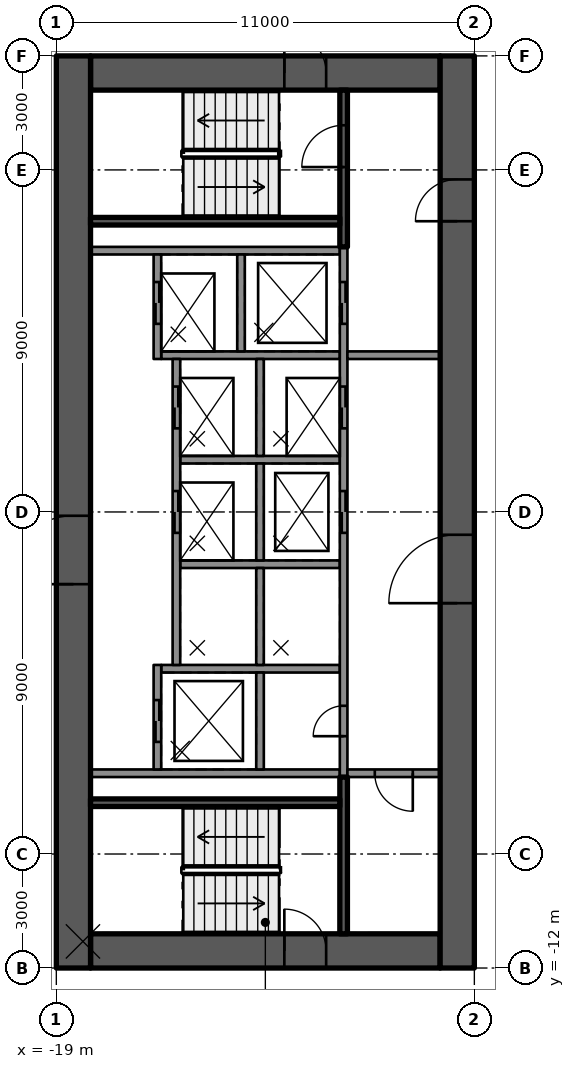
"""IFC4 building model, lengths in metres.
Left out: names, types, materials, properties, quantities, classifications, styles, units other than length and angle.
Written with IfcOpenShell. Run it as: python <this file> out.ifc"""

import sys

from ifc_helpers import new_model, si_unit, direction, frame, frame_2d, origin, place, context, subcontext, project, spatial, rectangle, extrude, element, fill, save


model = new_model("IFC4")
c1 = context("Model", 3, precision=1e-05, world=origin(), true_north=direction((0.0, 1.0)))
c2 = subcontext(c1, "Body", "Model", "MODEL_VIEW")
j1 = project(units=[si_unit("LENGTHUNIT", "METRE"), si_unit("PLANEANGLEUNIT", "RADIAN")], contexts=[c1])
p1 = place(None, origin())
s1 = spatial("IfcSite", under=j1, at=p1, CompositionType="ELEMENT")
p2 = place(p1, origin())
s2 = spatial("IfcBuilding", under=s1, at=p2, CompositionType="ELEMENT")
p3 = place(p2, frame((0.0, 0.0, 58.8)))
s3 = spatial("IfcBuildingStorey", under=s2, at=p3, CompositionType="ELEMENT", Elevation=58.8)
p4 = place(p3, frame((-18.1, 11.55, 0.0), z_axis=(0.0, 0.0, 1.0), x_axis=(1.0, 0.0, 0.0)))
e1 = element("IfcWall", 1, at=p4, inside=s3, PredefinedType="SHEAR", context=c2, shape_type="SweptSolid", body=[
    extrude(rectangle(XDim=9.2, YDim=0.9, at=frame_2d((4.6, 0.0))), origin(), (0.0, 0.0, 1.0), 3.5),
])
p5 = place(p4, frame((5.1, 0.0, 0.0)))
e2 = element("IfcOpeningElement", 2, at=p5, cuts=e1, PredefinedType="OPENING", context=c2, shape_type="SweptSolid", body=[
    extrude(rectangle(XDim=1.1, YDim=2.1, at=frame_2d((0.55, 1.05))), frame((0.0, 0.46, 0.0), z_axis=(0.0, -1.0, 0.0), x_axis=(1.0, 0.0, 0.0)), (0.0, 0.0, 1.0), 0.92),
])
p6 = place(p3, frame((-18.1, -11.55, 0.0), z_axis=(0.0, 0.0, 1.0), x_axis=(1.0, 0.0, 0.0)))
e3 = element("IfcWall", 3, at=p6, inside=s3, PredefinedType="SHEAR", context=c2, shape_type="SweptSolid", body=[
    extrude(rectangle(XDim=9.2, YDim=0.9, at=frame_2d((4.6, 0.0))), origin(), (0.0, 0.0, 1.0), 3.5),
])
p7 = place(p6, frame((5.1, 0.0, 0.0)))
e4 = element("IfcOpeningElement", 4, at=p7, cuts=e3, PredefinedType="OPENING", context=c2, shape_type="SweptSolid", body=[
    extrude(rectangle(XDim=1.1, YDim=2.1, at=frame_2d((0.55, 1.05))), frame((0.0, 0.46, 0.0), z_axis=(0.0, -1.0, 0.0), x_axis=(1.0, 0.0, 0.0)), (0.0, 0.0, 1.0), 0.92),
])
p8 = place(p3, frame((-18.55, -12.0, 0.0), z_axis=(0.0, 0.0, 1.0), x_axis=(0.0, 1.0, 0.0)))
e5 = element("IfcWall", 5, at=p8, inside=s3, PredefinedType="SHEAR", context=c2, shape_type="SweptSolid", body=[
    extrude(rectangle(XDim=24.0, YDim=0.9, at=frame_2d((12.0, 0.0))), origin(), (0.0, 0.0, 1.0), 3.5),
])
p9 = place(p8, frame((10.1, 0.0, 0.0)))
e6 = element("IfcOpeningElement", 6, at=p9, cuts=e5, PredefinedType="OPENING", context=c2, shape_type="SweptSolid", body=[
    extrude(rectangle(XDim=1.8, YDim=2.1, at=frame_2d((0.9, 1.05))), frame((0.0, 0.46, 0.0), z_axis=(0.0, -1.0, 0.0), x_axis=(1.0, 0.0, 0.0)), (0.0, 0.0, 1.0), 0.92),
])
p10 = place(p3, frame((-8.45, -12.0, 0.0), z_axis=(0.0, 0.0, 1.0), x_axis=(0.0, 1.0, 0.0)))
e7 = element("IfcWall", 7, at=p10, inside=s3, PredefinedType="SHEAR", context=c2, shape_type="SweptSolid", body=[
    extrude(rectangle(XDim=24.0, YDim=0.9, at=frame_2d((12.0, 0.0))), origin(), (0.0, 0.0, 1.0), 3.5),
])
p11 = place(p10, frame((9.6, 0.0, 0.0)))
e8 = element("IfcOpeningElement", 8, at=p11, cuts=e7, PredefinedType="OPENING", context=c2, shape_type="SweptSolid", body=[
    extrude(rectangle(XDim=1.8, YDim=2.1, at=frame_2d((0.9, 1.05))), frame((0.0, 0.46, 0.0), z_axis=(0.0, -1.0, 0.0), x_axis=(1.0, 0.0, 0.0)), (0.0, 0.0, 1.0), 0.92),
])
p12 = place(p10, frame((19.65, 0.0, 0.0)))
e9 = element("IfcOpeningElement", 9, at=p12, cuts=e7, PredefinedType="OPENING", context=c2, shape_type="SweptSolid", body=[
    extrude(rectangle(XDim=1.1, YDim=2.1, at=frame_2d((0.55, 1.05))), frame((0.0, 0.46, 0.0), z_axis=(0.0, -1.0, 0.0), x_axis=(1.0, 0.0, 0.0)), (0.0, 0.0, 1.0), 0.92),
])
for number, where, z_axis, x_axis in (
    (10, (-11.54, 6.875, 0.0), (0.0, 0.0, 1.0), (-1.0, 0.0, 0.0)),
    (11, (-11.54, -6.875, 0.0), (0.0, 0.0, 1.0), (-1.0, 0.0, 0.0)),
):
    element("IfcWall", number, at=place(p3, frame(where, z_axis=z_axis, x_axis=x_axis)), inside=s3, PredefinedType="SOLIDWALL", context=c2, shape_type="SweptSolid", body=[
        extrude(rectangle(XDim=6.56, YDim=0.2, at=frame_2d((3.28, 0.0))), origin(), (0.0, 0.0, 1.0), 3.09),
    ])
p13 = place(p3, frame((-11.54, -4.125, 0.0), z_axis=(0.0, 0.0, 1.0), x_axis=(-1.0, 0.0, 0.0)))
e12 = element("IfcWall", 12, at=p13, inside=s3, PredefinedType="SOLIDWALL", context=c2, shape_type="SweptSolid", body=[
    extrude(rectangle(XDim=4.7, YDim=0.2, at=frame_2d((2.35, 0.0))), origin(), (0.0, 0.0, 1.0), 3.09),
])
for number, where, z_axis, x_axis in (
    (13, (-11.54, -1.375, 0.0), (0.0, 0.0, 1.0), (-1.0, 0.0, 0.0)),
    (14, (-11.54, 1.375, 0.0), (0.0, 0.0, 1.0), (-1.0, 0.0, 0.0)),
):
    element("IfcWall", number, at=place(p3, frame(where, z_axis=z_axis, x_axis=x_axis)), inside=s3, PredefinedType="SOLIDWALL", context=c2, shape_type="SweptSolid", body=[
        extrude(rectangle(XDim=4.2, YDim=0.2, at=frame_2d((2.1, 0.0))), origin(), (0.0, 0.0, 1.0), 3.09),
    ])
p14 = place(p3, frame((-11.54, 4.125, 0.0), z_axis=(0.0, 0.0, 1.0), x_axis=(-1.0, 0.0, 0.0)))
e15 = element("IfcWall", 15, at=p14, inside=s3, PredefinedType="SOLIDWALL", context=c2, shape_type="SweptSolid", body=[
    extrude(rectangle(XDim=4.7, YDim=0.2, at=frame_2d((2.35, 0.0))), origin(), (0.0, 0.0, 1.0), 3.09),
])
p15 = place(p3, frame((-11.44, -6.975, 0.0), z_axis=(0.0, 0.0, 1.0), x_axis=(0.0, 1.0, 0.0)))
e16 = element("IfcWall", 16, at=p15, inside=s3, PredefinedType="SOLIDWALL", context=c2, shape_type="SweptSolid", body=[
    extrude(rectangle(XDim=13.95, YDim=0.2, at=frame_2d((6.975, 0.0))), origin(), (0.0, 0.0, 1.0), 3.09),
])
p16 = place(p15, frame((6.425, 0.0, 0.0)))
e17 = element("IfcOpeningElement", 17, at=p16, cuts=e16, PredefinedType="OPENING", context=c2, shape_type="SweptSolid", body=[
    extrude(rectangle(XDim=1.1, YDim=2.1, at=frame_2d((0.55, 1.05))), frame((0.0, 0.11, 0.0), z_axis=(0.0, -1.0, 0.0), x_axis=(1.0, 0.0, 0.0)), (0.0, 0.0, 1.0), 0.22),
])
p17 = place(p15, frame((9.175, 0.0, 0.0)))
e18 = element("IfcOpeningElement", 18, at=p17, cuts=e16, PredefinedType="OPENING", context=c2, shape_type="SweptSolid", body=[
    extrude(rectangle(XDim=1.1, YDim=2.1, at=frame_2d((0.55, 1.05))), frame((0.0, 0.11, 0.0), z_axis=(0.0, -1.0, 0.0), x_axis=(1.0, 0.0, 0.0)), (0.0, 0.0, 1.0), 0.22),
])
p18 = place(p15, frame((11.925, 0.0, 0.0)))
e19 = element("IfcOpeningElement", 19, at=p18, cuts=e16, PredefinedType="OPENING", context=c2, shape_type="SweptSolid", body=[
    extrude(rectangle(XDim=1.1, YDim=2.1, at=frame_2d((0.55, 1.05))), frame((0.0, 0.11, 0.0), z_axis=(0.0, -1.0, 0.0), x_axis=(1.0, 0.0, 0.0)), (0.0, 0.0, 1.0), 0.22),
])
p19 = place(p15, frame((1.075, 0.0, 0.0)))
e20 = element("IfcOpeningElement", 20, at=p19, cuts=e16, PredefinedType="OPENING", context=c2, shape_type="SweptSolid", body=[
    extrude(rectangle(XDim=0.8, YDim=2.1, at=frame_2d((0.4, 1.05))), frame((0.0, 0.11, 0.0), z_axis=(0.0, -1.0, 0.0), x_axis=(1.0, 0.0, 0.0)), (0.0, 0.0, 1.0), 0.22),
])
for number, where, z_axis, x_axis in (
    (21, (-13.64, -6.775, 0.0), (0.0, 0.0, 1.0), (0.0, 1.0, 0.0)),
    (22, (-13.64, -4.025, 0.0), (0.0, 0.0, 1.0), (0.0, 1.0, 0.0)),
    (23, (-13.64, -1.275, 0.0), (0.0, 0.0, 1.0), (0.0, 1.0, 0.0)),
    (24, (-13.64, 1.475, 0.0), (0.0, 0.0, 1.0), (0.0, 1.0, 0.0)),
    (25, (-14.14, 4.225, 0.0), (0.0, 0.0, 1.0), (0.0, 1.0, 0.0)),
):
    element("IfcWall", number, at=place(p3, frame(where, z_axis=z_axis, x_axis=x_axis)), inside=s3, PredefinedType="SOLIDWALL", context=c2, shape_type="SweptSolid", body=[
        extrude(rectangle(XDim=2.55, YDim=0.2, at=frame_2d((1.275, 0.0))), origin(), (0.0, 0.0, 1.0), 3.09),
    ])
p20 = place(p3, frame((-16.34, -6.775, 0.0), z_axis=(0.0, 0.0, 1.0), x_axis=(0.0, 1.0, 0.0)))
e26 = element("IfcWall", 26, at=p20, inside=s3, PredefinedType="SOLIDWALL", context=c2, shape_type="SweptSolid", body=[
    extrude(rectangle(XDim=2.75, YDim=0.2, at=frame_2d((1.375, 0.0))), origin(), (0.0, 0.0, 1.0), 3.09),
])
p21 = place(p20, frame((0.725, 0.0, 0.0)))
e27 = element("IfcOpeningElement", 27, at=p21, cuts=e26, PredefinedType="OPENING", context=c2, shape_type="SweptSolid", body=[
    extrude(rectangle(XDim=1.1, YDim=2.1, at=frame_2d((0.55, 1.05))), frame((0.0, 0.11, 0.0), z_axis=(0.0, -1.0, 0.0), x_axis=(1.0, 0.0, 0.0)), (0.0, 0.0, 1.0), 0.22),
])
p22 = place(p3, frame((-15.84, -4.025, 0.0), z_axis=(0.0, 0.0, 1.0), x_axis=(0.0, 1.0, 0.0)))
e28 = element("IfcWall", 28, at=p22, inside=s3, PredefinedType="SOLIDWALL", context=c2, shape_type="SweptSolid", body=[
    extrude(rectangle(XDim=8.05, YDim=0.2, at=frame_2d((4.025, 0.0))), origin(), (0.0, 0.0, 1.0), 3.09),
])
p23 = place(p22, frame((3.475, 0.0, 0.0)))
e29 = element("IfcOpeningElement", 29, at=p23, cuts=e28, PredefinedType="OPENING", context=c2, shape_type="SweptSolid", body=[
    extrude(rectangle(XDim=1.1, YDim=2.1, at=frame_2d((0.55, 1.05))), frame((0.0, 0.11, 0.0), z_axis=(0.0, -1.0, 0.0), x_axis=(1.0, 0.0, 0.0)), (0.0, 0.0, 1.0), 0.22),
])
p24 = place(p22, frame((6.225, 0.0, 0.0)))
e30 = element("IfcOpeningElement", 30, at=p24, cuts=e28, PredefinedType="OPENING", context=c2, shape_type="SweptSolid", body=[
    extrude(rectangle(XDim=1.1, YDim=2.1, at=frame_2d((0.55, 1.05))), frame((0.0, 0.11, 0.0), z_axis=(0.0, -1.0, 0.0), x_axis=(1.0, 0.0, 0.0)), (0.0, 0.0, 1.0), 0.22),
])
p25 = place(p3, frame((-16.34, 4.025, 0.0), z_axis=(0.0, 0.0, 1.0), x_axis=(0.0, 1.0, 0.0)))
e31 = element("IfcWall", 31, at=p25, inside=s3, PredefinedType="SOLIDWALL", context=c2, shape_type="SweptSolid", body=[
    extrude(rectangle(XDim=2.75, YDim=0.2, at=frame_2d((1.375, 0.0))), origin(), (0.0, 0.0, 1.0), 3.09),
])
p26 = place(p25, frame((0.925, 0.0, 0.0)))
e32 = element("IfcOpeningElement", 32, at=p26, cuts=e31, PredefinedType="OPENING", context=c2, shape_type="SweptSolid", body=[
    extrude(rectangle(XDim=1.1, YDim=2.1, at=frame_2d((0.55, 1.05))), frame((0.0, 0.11, 0.0), z_axis=(0.0, -1.0, 0.0), x_axis=(1.0, 0.0, 0.0)), (0.0, 0.0, 1.0), 0.22),
])
p27 = place(p3, frame((-11.44, 6.975, 0.0), z_axis=(0.0, 0.0, 1.0), x_axis=(0.0, 1.0, 0.0)))
e33 = element("IfcWall", 33, at=p27, inside=s3, PredefinedType="SOLIDWALL", context=c2, shape_type="SweptSolid", body=[
    extrude(rectangle(XDim=4.125, YDim=0.2, at=frame_2d((2.062, 0.0))), origin(), (0.0, 0.0, 1.0), 3.09),
])
p28 = place(p27, frame((2.1, 0.0, 0.0)))
e34 = element("IfcOpeningElement", 34, at=p28, cuts=e33, PredefinedType="OPENING", context=c2, shape_type="SweptSolid", body=[
    extrude(rectangle(XDim=1.1, YDim=2.1, at=frame_2d((0.55, 1.05))), frame((0.0, 0.11, 0.0), z_axis=(0.0, -1.0, 0.0), x_axis=(1.0, 0.0, 0.0)), (0.0, 0.0, 1.0), 0.22),
])
p29 = place(p3, frame((-11.54, 7.65, 0.0), z_axis=(0.0, 0.0, 1.0), x_axis=(-1.0, 0.0, 0.0)))
e35 = element("IfcWall", 35, at=p29, inside=s3, PredefinedType="SOLIDWALL", context=c2, shape_type="SweptSolid", body=[
    extrude(rectangle(XDim=6.56, YDim=0.2, at=frame_2d((3.28, 0.0))), origin(), (0.0, 0.0, 1.0), 3.09),
])
p30 = place(p3, frame((-11.44, -11.1, 0.0), z_axis=(0.0, 0.0, 1.0), x_axis=(0.0, 1.0, 0.0)))
e36 = element("IfcWall", 36, at=p30, inside=s3, PredefinedType="SOLIDWALL", context=c2, shape_type="SweptSolid", body=[
    extrude(rectangle(XDim=4.125, YDim=0.2, at=frame_2d((2.062, 0.0))), origin(), (0.0, 0.0, 1.0), 3.09),
])
p31 = place(p3, frame((-11.54, -7.65, 0.0), z_axis=(0.0, 0.0, 1.0), x_axis=(-1.0, 0.0, 0.0)))
e37 = element("IfcWall", 37, at=p31, inside=s3, PredefinedType="SOLIDWALL", context=c2, shape_type="SweptSolid", body=[
    extrude(rectangle(XDim=6.56, YDim=0.2, at=frame_2d((3.28, 0.0))), origin(), (0.0, 0.0, 1.0), 3.09),
])
p32 = place(p3, frame((-8.9, 4.125, 0.0), z_axis=(0.0, 0.0, 1.0), x_axis=(-1.0, 0.0, 0.0)))
e38 = element("IfcWall", 38, at=p32, inside=s3, PredefinedType="PARTITIONING", context=c2, shape_type="SweptSolid", body=[
    extrude(rectangle(XDim=2.44, YDim=0.2, at=frame_2d((1.22, 0.0))), origin(), (0.0, 0.0, 1.0), 3.09),
])
p33 = place(p3, frame((-8.9, -6.875, 0.0), z_axis=(0.0, 0.0, 1.0), x_axis=(-1.0, 0.0, 0.0)))
e39 = element("IfcWall", 39, at=p33, inside=s3, PredefinedType="PARTITIONING", context=c2, shape_type="SweptSolid", body=[
    extrude(rectangle(XDim=2.44, YDim=0.2, at=frame_2d((1.22, 0.0))), origin(), (0.0, 0.0, 1.0), 3.09),
])
p34 = place(p33, frame((0.72, 0.0, 0.0)))
e40 = element("IfcOpeningElement", 40, at=p34, cuts=e39, PredefinedType="OPENING", context=c2, shape_type="SweptSolid", body=[
    extrude(rectangle(XDim=1.0, YDim=2.1, at=frame_2d((0.5, 1.05))), frame((0.0, 0.11, 0.0), z_axis=(0.0, -1.0, 0.0), x_axis=(1.0, 0.0, 0.0)), (0.0, 0.0, 1.0), 0.22),
])
p35 = place(p21, origin())
e41 = element("IfcDoor", 41, at=p35, inside=s3, OperationType="DOUBLE_DOOR_SLIDING", PredefinedType="DOOR", context=c2, shape_type="SweptSolid", body=[
    extrude(rectangle(XDim=1.1, YDim=2.1, at=frame_2d((0.55, 1.05))), frame((0.0, 0.025, 0.0), z_axis=(0.0, -1.0, 0.0), x_axis=(1.0, 0.0, 0.0)), (0.0, 0.0, 1.0), 0.05),
])
fill(e27, e41)
p36 = place(p16, origin())
e42 = element("IfcDoor", 42, at=p36, inside=s3, OperationType="DOUBLE_DOOR_SLIDING", PredefinedType="DOOR", context=c2, shape_type="SweptSolid", body=[
    extrude(rectangle(XDim=1.1, YDim=2.1, at=frame_2d((0.55, 1.05))), frame((0.0, 0.025, 0.0), z_axis=(0.0, -1.0, 0.0), x_axis=(1.0, 0.0, 0.0)), (0.0, 0.0, 1.0), 0.05),
])
fill(e17, e42)
p37 = place(p23, origin())
e43 = element("IfcDoor", 43, at=p37, inside=s3, OperationType="DOUBLE_DOOR_SLIDING", PredefinedType="DOOR", context=c2, shape_type="SweptSolid", body=[
    extrude(rectangle(XDim=1.1, YDim=2.1, at=frame_2d((0.55, 1.05))), frame((0.0, 0.025, 0.0), z_axis=(0.0, -1.0, 0.0), x_axis=(1.0, 0.0, 0.0)), (0.0, 0.0, 1.0), 0.05),
])
fill(e29, e43)
p38 = place(p17, origin())
e44 = element("IfcDoor", 44, at=p38, inside=s3, OperationType="DOUBLE_DOOR_SLIDING", PredefinedType="DOOR", context=c2, shape_type="SweptSolid", body=[
    extrude(rectangle(XDim=1.1, YDim=2.1, at=frame_2d((0.55, 1.05))), frame((0.0, 0.025, 0.0), z_axis=(0.0, -1.0, 0.0), x_axis=(1.0, 0.0, 0.0)), (0.0, 0.0, 1.0), 0.05),
])
fill(e18, e44)
p39 = place(p24, origin())
e45 = element("IfcDoor", 45, at=p39, inside=s3, OperationType="DOUBLE_DOOR_SLIDING", PredefinedType="DOOR", context=c2, shape_type="SweptSolid", body=[
    extrude(rectangle(XDim=1.1, YDim=2.1, at=frame_2d((0.55, 1.05))), frame((0.0, 0.025, 0.0), z_axis=(0.0, -1.0, 0.0), x_axis=(1.0, 0.0, 0.0)), (0.0, 0.0, 1.0), 0.05),
])
fill(e30, e45)
p40 = place(p18, origin())
e46 = element("IfcDoor", 46, at=p40, inside=s3, OperationType="DOUBLE_DOOR_SLIDING", PredefinedType="DOOR", context=c2, shape_type="SweptSolid", body=[
    extrude(rectangle(XDim=1.1, YDim=2.1, at=frame_2d((0.55, 1.05))), frame((0.0, 0.025, 0.0), z_axis=(0.0, -1.0, 0.0), x_axis=(1.0, 0.0, 0.0)), (0.0, 0.0, 1.0), 0.05),
])
fill(e19, e46)
p41 = place(p26, origin())
e47 = element("IfcDoor", 47, at=p41, inside=s3, OperationType="DOUBLE_DOOR_SLIDING", PredefinedType="DOOR", context=c2, shape_type="SweptSolid", body=[
    extrude(rectangle(XDim=1.1, YDim=2.1, at=frame_2d((0.55, 1.05))), frame((0.0, 0.025, 0.0), z_axis=(0.0, -1.0, 0.0), x_axis=(1.0, 0.0, 0.0)), (0.0, 0.0, 1.0), 0.05),
])
fill(e32, e47)
p42 = place(p19, origin())
e48 = element("IfcDoor", 48, at=p42, inside=s3, OperationType="SINGLE_SWING_LEFT", PredefinedType="DOOR", context=c2, shape_type="SweptSolid", body=[
    extrude(rectangle(XDim=0.8, YDim=2.1, at=frame_2d((0.4, 1.05))), frame((0.0, 0.025, 0.0), z_axis=(0.0, -1.0, 0.0), x_axis=(1.0, 0.0, 0.0)), (0.0, 0.0, 1.0), 0.05),
])
fill(e20, e48)
p43 = place(p11, origin())
e49 = element("IfcDoor", 49, at=p43, inside=s3, OperationType="SINGLE_SWING_LEFT", PredefinedType="DOOR", context=c2, shape_type="SweptSolid", body=[
    extrude(rectangle(XDim=1.8, YDim=2.1, at=frame_2d((0.9, 1.05))), frame((0.0, 0.025, 0.0), z_axis=(0.0, -1.0, 0.0), x_axis=(1.0, 0.0, 0.0)), (0.0, 0.0, 1.0), 0.05),
])
fill(e8, e49)
p44 = place(p9, origin())
e50 = element("IfcDoor", 50, at=p44, inside=s3, OperationType="SINGLE_SWING_LEFT", PredefinedType="DOOR", context=c2, shape_type="SweptSolid", body=[
    extrude(rectangle(XDim=1.8, YDim=2.1, at=frame_2d((0.9, 1.05))), frame((0.0, 0.025, 0.0), z_axis=(0.0, -1.0, 0.0), x_axis=(1.0, 0.0, 0.0)), (0.0, 0.0, 1.0), 0.05),
])
fill(e6, e50)
p45 = place(p12, origin())
e51 = element("IfcDoor", 51, at=p45, inside=s3, OperationType="SINGLE_SWING_RIGHT", PredefinedType="DOOR", context=c2, shape_type="SweptSolid", body=[
    extrude(rectangle(XDim=1.1, YDim=2.1, at=frame_2d((0.55, 1.05))), frame((0.0, 0.025, 0.0), z_axis=(0.0, -1.0, 0.0), x_axis=(1.0, 0.0, 0.0)), (0.0, 0.0, 1.0), 0.05),
])
fill(e9, e51)
p46 = place(p5, origin())
e52 = element("IfcDoor", 52, at=p46, inside=s3, OperationType="SINGLE_SWING_RIGHT", PredefinedType="DOOR", context=c2, shape_type="SweptSolid", body=[
    extrude(rectangle(XDim=1.1, YDim=2.1, at=frame_2d((0.55, 1.05))), frame((0.0, 0.025, 0.0), z_axis=(0.0, -1.0, 0.0), x_axis=(1.0, 0.0, 0.0)), (0.0, 0.0, 1.0), 0.05),
])
fill(e2, e52)
p47 = place(p7, origin())
e53 = element("IfcDoor", 53, at=p47, inside=s3, OperationType="SINGLE_SWING_RIGHT", PredefinedType="DOOR", context=c2, shape_type="SweptSolid", body=[
    extrude(rectangle(XDim=1.1, YDim=2.1, at=frame_2d((0.55, 1.05))), frame((0.0, 0.025, 0.0), z_axis=(0.0, -1.0, 0.0), x_axis=(1.0, 0.0, 0.0)), (0.0, 0.0, 1.0), 0.05),
])
fill(e4, e53)
p48 = place(p28, origin())
e54 = element("IfcDoor", 54, at=p48, inside=s3, OperationType="SINGLE_SWING_RIGHT", PredefinedType="DOOR", context=c2, shape_type="SweptSolid", body=[
    extrude(rectangle(XDim=1.1, YDim=2.1, at=frame_2d((0.55, 1.05))), frame((0.0, 0.025, 0.0), z_axis=(0.0, -1.0, 0.0), x_axis=(1.0, 0.0, 0.0)), (0.0, 0.0, 1.0), 0.05),
])
fill(e34, e54)
p49 = place(p34, origin())
e55 = element("IfcDoor", 55, at=p49, inside=s3, OperationType="SINGLE_SWING_RIGHT", PredefinedType="DOOR", context=c2, shape_type="SweptSolid", body=[
    extrude(rectangle(XDim=1.0, YDim=2.1, at=frame_2d((0.5, 1.05))), frame((0.0, 0.025, 0.0), z_axis=(0.0, -1.0, 0.0), x_axis=(1.0, 0.0, 0.0)), (0.0, 0.0, 1.0), 0.05),
])
fill(e40, e55)
save(model, sys.argv[1])
